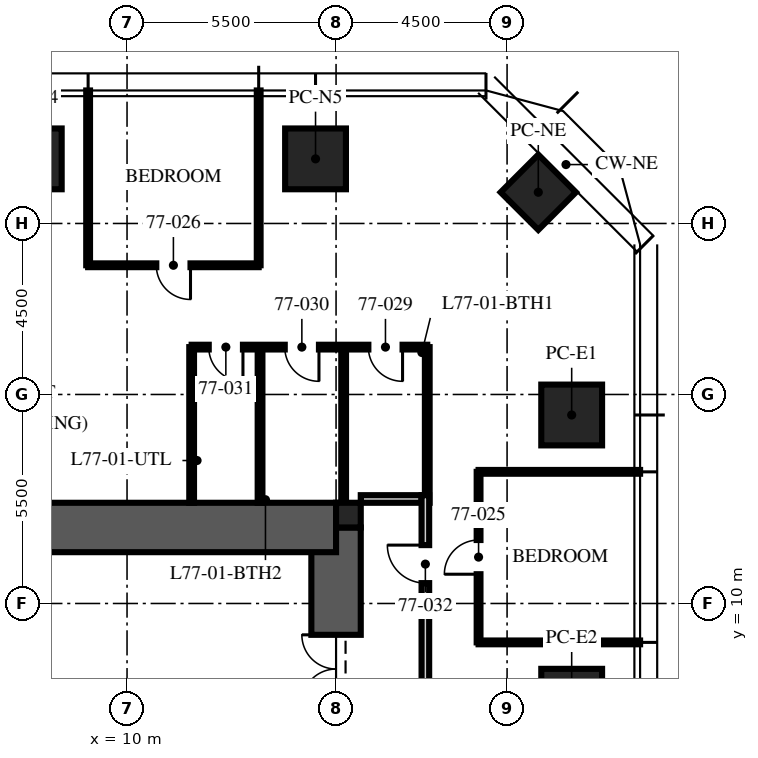
"""IFC4 building model, lengths in metres.
Left out: names, types, materials, properties, quantities, classifications, styles, units other than length and angle.
Written with IfcOpenShell. Run it as: python <this file> out.ifc"""

import sys

from ifc_helpers import new_model, si_unit, direction, frame, frame_2d, origin, origin_2d, place, context, subcontext, project, spatial, rectangle, extrude, element, fill, save


model = new_model("IFC4")
c1 = context("Model", 3, precision=1e-05, world=origin(), true_north=direction((0.0, 1.0)))
c2 = subcontext(c1, "Body", "Model", "MODEL_VIEW")
j1 = project(units=[si_unit("LENGTHUNIT", "METRE"), si_unit("PLANEANGLEUNIT", "RADIAN")], contexts=[c1])
p1 = place(None, origin())
s1 = spatial("IfcSite", under=j1, at=p1, CompositionType="ELEMENT")
p2 = place(p1, origin())
s2 = spatial("IfcBuilding", under=s1, at=p2, CompositionType="ELEMENT")
p3 = place(p2, frame((0.0, 0.0, 308.25)))
s3 = spatial("IfcBuildingStorey", under=s2, at=p3, CompositionType="ELEMENT", Elevation=308.25)
p4 = place(p3, frame((15.5, -12.0, -0.25), z_axis=(0.0, 0.0, 1.0), x_axis=(0.0, 1.0, 0.0)))
e1 = element("IfcWall", 1, at=p4, inside=s3, PredefinedType="SHEAR", context=c2, shape_type="SweptSolid", body=[
    extrude(rectangle(XDim=24.0, YDim=1.3, at=frame_2d((12.0, 0.0))), origin(), (0.0, 0.0, 1.0), 3.75),
])
p5 = place(p4, frame((3.125, 0.0, 0.25)))
e2 = element("IfcOpeningElement", 2, at=p5, cuts=e1, PredefinedType="OPENING", context=c2, shape_type="SweptSolid", body=[
    extrude(rectangle(XDim=1.2, YDim=2.1, at=frame_2d((0.6, 1.05))), frame((0.0, 0.66, 0.0), z_axis=(0.0, -1.0, 0.0), x_axis=(1.0, 0.0, 0.0)), (0.0, 0.0, 1.0), 1.32),
])
p6 = place(p4, frame((19.375, 0.0, 0.25)))
e3 = element("IfcOpeningElement", 3, at=p6, cuts=e1, PredefinedType="OPENING", context=c2, shape_type="SweptSolid", body=[
    extrude(rectangle(XDim=1.8, YDim=2.1, at=frame_2d((0.9, 1.05))), frame((0.0, 0.66, 0.0), z_axis=(0.0, -1.0, 0.0), x_axis=(1.0, 0.0, 0.0)), (0.0, 0.0, 1.0), 1.32),
])
p7 = place(p3, frame((-15.5, 12.0, -0.25), z_axis=(0.0, 0.0, 1.0), x_axis=(1.0, 0.0, 0.0)))
e4 = element("IfcWall", 4, at=p7, inside=s3, PredefinedType="SHEAR", context=c2, shape_type="SweptSolid", body=[
    extrude(rectangle(XDim=31.0, YDim=1.3, at=frame_2d((15.5, 0.0))), origin(), (0.0, 0.0, 1.0), 3.75),
])
p8 = place(p3, frame((15.825, 12.325, -0.25), z_axis=(0.0, 0.0, 1.0), x_axis=(1.0, 0.0, 0.0)))
e5 = element("IfcColumn", 5, at=p8, inside=s3, PredefinedType="COLUMN", context=c2, shape_type="SweptSolid", body=[
    extrude(rectangle(XDim=0.65, YDim=0.65, at=origin_2d()), origin(), (0.0, 0.0, 1.0), 3.75),
])
for number, where, z_axis, x_axis in (
    (6, (7.48, 21.7, 0.0), (0.0, 0.0, 1.0), (1.0, 0.0, 0.0)),
    (7, (14.96, 21.7, 0.0), (0.0, 0.0, 1.0), (1.0, 0.0, 0.0)),
    (8, (21.7, 14.96, 0.0), (0.0, 0.0, 1.0), (0.0, 1.0, 0.0)),
    (9, (21.7, 7.48, 0.0), (0.0, 0.0, 1.0), (0.0, 1.0, 0.0)),
):
    element("IfcColumn", number, at=place(p3, frame(where, z_axis=z_axis, x_axis=x_axis)), inside=s3, PredefinedType="COLUMN", context=c2, shape_type="SweptSolid", body=[
        extrude(rectangle(XDim=1.6, YDim=1.6, at=origin_2d()), origin(), (0.0, 0.0, 1.0), 3.75),
    ])
p9 = place(p3, frame((20.821, 20.821, 0.0), z_axis=(0.0, 0.0, 1.0), x_axis=(0.707106781187, -0.707106781187, 0.0)))
e10 = element("IfcColumn", 10, at=p9, inside=s3, PredefinedType="COLUMN", context=c2, shape_type="SweptSolid", body=[
    extrude(rectangle(XDim=1.4, YDim=1.4, at=origin_2d()), origin(), (0.0, 0.0, 1.0), 3.75),
])
p10 = place(p3, frame((16.15, 12.75, 0.0), z_axis=(0.0, 0.0, 1.0), x_axis=(1.0, 0.0, 0.0)))
e11 = element("IfcWall", 11, at=p10, inside=s3, PredefinedType="PARTITIONING", context=c2, shape_type="SweptSolid", body=[
    extrude(rectangle(XDim=1.6, YDim=0.2, at=frame_2d((0.8, 0.0))), origin(), (0.0, 0.0, 1.0), 2.6),
])
for number, where, z_axis, x_axis in (
    (12, (19.25, 8.976, 0.0), (0.0, 0.0, 1.0), (1.0, 0.0, 0.0)),
    (13, (19.25, 13.464, 0.0), (0.0, 0.0, 1.0), (1.0, 0.0, 0.0)),
):
    element("IfcWall", number, at=place(p3, frame(where, z_axis=z_axis, x_axis=x_axis)), inside=s3, PredefinedType="PARTITIONING", context=c2, shape_type="SweptSolid", body=[
        extrude(rectangle(XDim=4.25, YDim=0.1, at=frame_2d((2.125, 0.0))), origin(), (0.0, 0.0, 1.0), 3.01),
    ])
for number, where, z_axis, x_axis in (
    (14, (13.464, 18.9, 0.0), (0.0, 0.0, 1.0), (0.0, 1.0, 0.0)),
    (15, (8.976, 18.9, 0.0), (0.0, 0.0, 1.0), (0.0, 1.0, 0.0)),
):
    element("IfcWall", number, at=place(p3, frame(where, z_axis=z_axis, x_axis=x_axis)), inside=s3, PredefinedType="PARTITIONING", context=c2, shape_type="SweptSolid", body=[
        extrude(rectangle(XDim=4.6, YDim=0.1, at=frame_2d((2.3, 0.0))), origin(), (0.0, 0.0, 1.0), 3.01),
    ])
p11 = place(p3, frame((19.25, 8.976, 0.0), z_axis=(0.0, 0.0, 1.0), x_axis=(0.0, 1.0, 0.0)))
e16 = element("IfcWall", 16, at=p11, inside=s3, PredefinedType="PARTITIONING", context=c2, shape_type="SweptSolid", body=[
    extrude(rectangle(XDim=4.488, YDim=0.1, at=frame_2d((2.244, 0.0))), origin(), (0.0, 0.0, 1.0), 2.91),
])
p12 = place(p11, frame((1.794, 0.0, 0.0)))
e17 = element("IfcOpeningElement", 17, at=p12, cuts=e16, PredefinedType="OPENING", context=c2, shape_type="SweptSolid", body=[
    extrude(rectangle(XDim=0.9, YDim=2.1, at=frame_2d((0.45, 1.05))), frame((0.0, 0.06, 0.0), z_axis=(0.0, -1.0, 0.0), x_axis=(1.0, 0.0, 0.0)), (0.0, 0.0, 1.0), 0.12),
])
p13 = place(p3, frame((13.464, 18.9, 0.0), z_axis=(0.0, 0.0, 1.0), x_axis=(-1.0, 0.0, 0.0)))
e18 = element("IfcWall", 18, at=p13, inside=s3, PredefinedType="PARTITIONING", context=c2, shape_type="SweptSolid", body=[
    extrude(rectangle(XDim=4.488, YDim=0.1, at=frame_2d((2.244, 0.0))), origin(), (0.0, 0.0, 1.0), 2.91),
])
p14 = place(p13, frame((1.794, 0.0, 0.0)))
e19 = element("IfcOpeningElement", 19, at=p14, cuts=e18, PredefinedType="OPENING", context=c2, shape_type="SweptSolid", body=[
    extrude(rectangle(XDim=0.9, YDim=2.1, at=frame_2d((0.45, 1.05))), frame((0.0, 0.06, 0.0), z_axis=(0.0, -1.0, 0.0), x_axis=(1.0, 0.0, 0.0)), (0.0, 0.0, 1.0), 0.12),
])
p15 = place(p3, frame((17.9, 16.746, 0.0), z_axis=(0.0, 0.0, 1.0), x_axis=(-1.0, 0.0, 0.0)))
e20 = element("IfcWall", 20, at=p15, inside=s3, PredefinedType="PARTITIONING", context=c2, shape_type="SweptSolid", body=[
    extrude(rectangle(XDim=6.2, YDim=0.125, at=frame_2d((3.1, 0.0))), origin(), (0.0, 0.0, 1.0), 2.9),
])
p16 = place(p15, frame((0.65, 0.0, 0.0)))
e21 = element("IfcOpeningElement", 21, at=p16, cuts=e20, PredefinedType="OPENING", context=c2, shape_type="SweptSolid", body=[
    extrude(rectangle(XDim=0.9, YDim=2.1, at=frame_2d((0.45, 1.05))), frame((0.0, 0.073, 0.0), z_axis=(0.0, -1.0, 0.0), x_axis=(1.0, 0.0, 0.0)), (0.0, 0.0, 1.0), 0.145),
])
p17 = place(p15, frame((2.85, 0.0, 0.0)))
e22 = element("IfcOpeningElement", 22, at=p17, cuts=e20, PredefinedType="OPENING", context=c2, shape_type="SweptSolid", body=[
    extrude(rectangle(XDim=0.9, YDim=2.1, at=frame_2d((0.45, 1.05))), frame((0.0, 0.073, 0.0), z_axis=(0.0, -1.0, 0.0), x_axis=(1.0, 0.0, 0.0)), (0.0, 0.0, 1.0), 0.145),
])
p18 = place(p15, frame((4.85, 0.0, 0.0)))
e23 = element("IfcOpeningElement", 23, at=p18, cuts=e20, PredefinedType="OPENING", context=c2, shape_type="SweptSolid", body=[
    extrude(rectangle(XDim=0.9, YDim=2.1, at=frame_2d((0.45, 1.05))), frame((0.0, 0.073, 0.0), z_axis=(0.0, -1.0, 0.0), x_axis=(1.0, 0.0, 0.0)), (0.0, 0.0, 1.0), 0.145),
])
for number, where, z_axis, x_axis in (
    (24, (17.9, 12.65, 0.0), (0.0, 0.0, 1.0), (0.0, 1.0, 0.0)),
    (25, (15.7, 12.65, 0.0), (0.0, 0.0, 1.0), (0.0, 1.0, 0.0)),
):
    element("IfcWall", number, at=place(p3, frame(where, z_axis=z_axis, x_axis=x_axis)), inside=s3, PredefinedType="PARTITIONING", context=c2, shape_type="SweptSolid", body=[
        extrude(rectangle(XDim=4.096, YDim=0.125, at=frame_2d((2.048, 0.0))), origin(), (0.0, 0.0, 1.0), 2.6),
    ])
for number, where, z_axis, x_axis in (
    (26, (13.5, 12.65, 0.0), (0.0, 0.0, 1.0), (0.0, 1.0, 0.0)),
    (27, (11.7, 12.65, 0.0), (0.0, 0.0, 1.0), (0.0, 1.0, 0.0)),
):
    element("IfcWall", number, at=place(p3, frame(where, z_axis=z_axis, x_axis=x_axis)), inside=s3, PredefinedType="PARTITIONING", context=c2, shape_type="SweptSolid", body=[
        extrude(rectangle(XDim=4.096, YDim=0.125, at=frame_2d((2.048, 0.0))), origin(), (0.0, 0.0, 1.0), 3.5),
    ])
p19 = place(p3, frame((17.85, -12.85, 0.0), z_axis=(0.0, 0.0, 1.0), x_axis=(0.0, 1.0, 0.0)))
e28 = element("IfcWall", 28, at=p19, inside=s3, PredefinedType="PARTITIONING", context=c2, shape_type="SweptSolid", body=[
    extrude(rectangle(XDim=25.7, YDim=0.2, at=frame_2d((12.85, 0.0))), origin(), (0.0, 0.0, 1.0), 2.9),
])
p20 = place(p19, frame((23.386, 0.0, 0.0)))
e29 = element("IfcOpeningElement", 29, at=p20, cuts=e28, PredefinedType="OPENING", context=c2, shape_type="SweptSolid", body=[
    extrude(rectangle(XDim=1.0, YDim=2.2, at=frame_2d((0.5, 1.1))), frame((0.0, 0.11, 0.0), z_axis=(0.0, -1.0, 0.0), x_axis=(1.0, 0.0, 0.0)), (0.0, 0.0, 1.0), 0.22),
])
p21 = place(p19, frame((5.1, 0.0, 0.0)))
e30 = element("IfcOpeningElement", 30, at=p21, cuts=e28, PredefinedType="OPENING", context=c2, shape_type="SweptSolid", body=[
    extrude(rectangle(XDim=1.0, YDim=2.2, at=frame_2d((0.5, 1.1))), frame((0.0, 0.11, 0.0), z_axis=(0.0, -1.0, 0.0), x_axis=(1.0, 0.0, 0.0)), (0.0, 0.0, 1.0), 0.22),
])
p22 = place(p6, origin())
e31 = element("IfcDoor", 31, at=p22, inside=s3, OperationType="DOUBLE_DOOR_SINGLE_SWING", PredefinedType="DOOR", context=c2, shape_type="SweptSolid", body=[
    extrude(rectangle(XDim=1.8, YDim=2.1, at=frame_2d((0.9, 1.05))), frame((0.0, 0.025, 0.0), z_axis=(0.0, -1.0, 0.0), x_axis=(1.0, 0.0, 0.0)), (0.0, 0.0, 1.0), 0.05),
])
fill(e3, e31)
p23 = place(p12, origin())
e32 = element("IfcDoor", 32, at=p23, inside=s3, OperationType="SINGLE_SWING_LEFT", PredefinedType="DOOR", context=c2, shape_type="SweptSolid", body=[
    extrude(rectangle(XDim=0.9, YDim=2.1, at=frame_2d((0.45, 1.05))), frame((0.0, 0.025, 0.0), z_axis=(0.0, -1.0, 0.0), x_axis=(1.0, 0.0, 0.0)), (0.0, 0.0, 1.0), 0.05),
])
fill(e17, e32)
p24 = place(p14, origin())
e33 = element("IfcDoor", 33, at=p24, inside=s3, OperationType="SINGLE_SWING_LEFT", PredefinedType="DOOR", context=c2, shape_type="SweptSolid", body=[
    extrude(rectangle(XDim=0.9, YDim=2.1, at=frame_2d((0.45, 1.05))), frame((0.0, 0.025, 0.0), z_axis=(0.0, -1.0, 0.0), x_axis=(1.0, 0.0, 0.0)), (0.0, 0.0, 1.0), 0.05),
])
fill(e19, e33)
p25 = place(p16, origin())
e34 = element("IfcDoor", 34, at=p25, inside=s3, OperationType="SINGLE_SWING_LEFT", PredefinedType="DOOR", context=c2, shape_type="SweptSolid", body=[
    extrude(rectangle(XDim=0.9, YDim=2.1, at=frame_2d((0.45, 1.05))), frame((0.0, 0.025, 0.0), z_axis=(0.0, -1.0, 0.0), x_axis=(1.0, 0.0, 0.0)), (0.0, 0.0, 1.0), 0.05),
])
fill(e21, e34)
p26 = place(p17, origin())
e35 = element("IfcDoor", 35, at=p26, inside=s3, OperationType="SINGLE_SWING_LEFT", PredefinedType="DOOR", context=c2, shape_type="SweptSolid", body=[
    extrude(rectangle(XDim=0.9, YDim=2.1, at=frame_2d((0.45, 1.05))), frame((0.0, 0.025, 0.0), z_axis=(0.0, -1.0, 0.0), x_axis=(1.0, 0.0, 0.0)), (0.0, 0.0, 1.0), 0.05),
])
fill(e22, e35)
p27 = place(p18, origin())
e36 = element("IfcDoor", 36, at=p27, inside=s3, OperationType="SINGLE_SWING_LEFT", PredefinedType="DOOR", context=c2, shape_type="SweptSolid", body=[
    extrude(rectangle(XDim=0.9, YDim=2.1, at=frame_2d((0.45, 1.05))), frame((0.0, 0.025, 0.0), z_axis=(0.0, -1.0, 0.0), x_axis=(1.0, 0.0, 0.0)), (0.0, 0.0, 1.0), 0.05),
])
fill(e23, e36)
p28 = place(p20, origin())
e37 = element("IfcDoor", 37, at=p28, inside=s3, OperationType="SINGLE_SWING_RIGHT", PredefinedType="DOOR", context=c2, shape_type="SweptSolid", body=[
    extrude(rectangle(XDim=1.0, YDim=2.2, at=frame_2d((0.5, 1.1))), frame((0.0, 0.025, 0.0), z_axis=(0.0, -1.0, 0.0), x_axis=(1.0, 0.0, 0.0)), (0.0, 0.0, 1.0), 0.05),
])
fill(e29, e37)
save(model, sys.argv[1])
